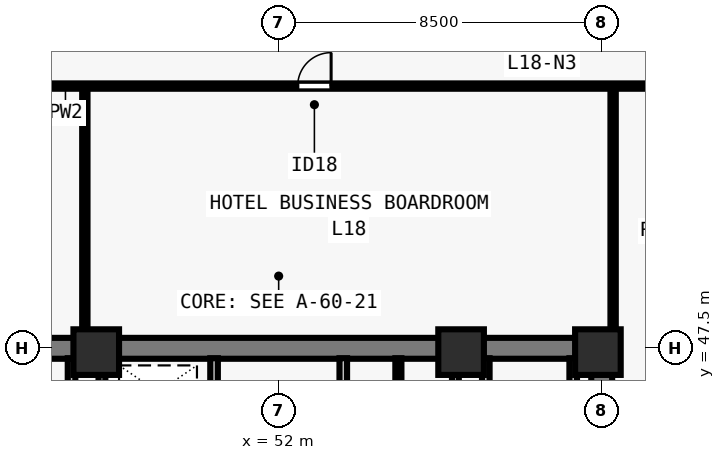
"""IFC4 building model, lengths in metres.
Left out: names, types, materials, properties, quantities, classifications, styles, units other than length and angle.
Written with IfcOpenShell. Run it as: python <this file> out.ifc"""

import sys

from ifc_helpers import new_model, si_unit, direction, frame, frame_2d, origin, origin_2d, place, context, subcontext, project, spatial, rectangle, extrude, element, fill, save


model = new_model("IFC4")
c1 = context("Model", 3, precision=1e-05, world=origin(), true_north=direction((0.0, 1.0)))
c2 = subcontext(c1, "Body", "Model", "MODEL_VIEW")
j1 = project(units=[si_unit("LENGTHUNIT", "METRE"), si_unit("PLANEANGLEUNIT", "RADIAN")], contexts=[c1])
p1 = place(None, origin())
s1 = spatial("IfcSite", under=j1, at=p1, CompositionType="ELEMENT")
p2 = place(p1, origin())
s2 = spatial("IfcBuilding", under=s1, at=p2, CompositionType="ELEMENT")
p3 = place(p2, frame((0.0, 0.0, 69.0)))
s3 = spatial("IfcBuildingStorey", under=s2, at=p3, CompositionType="ELEMENT", Elevation=69.0)
for number, where, z_axis, x_axis in (
    (1, (47.2, 47.4, 0.0), (0.0, 0.0, 1.0), (1.0, 0.0, 0.0)),
    (2, (56.8, 47.4, 0.0), (0.0, 0.0, 1.0), (1.0, 0.0, 0.0)),
    (3, (60.4, 47.4, 0.0), (0.0, 0.0, 1.0), (1.0, 0.0, 0.0)),
):
    element("IfcColumn", number, at=place(p3, frame(where, z_axis=z_axis, x_axis=x_axis)), inside=s3, PredefinedType="COLUMN", context=c2, shape_type="SweptSolid", body=[
        extrude(rectangle(XDim=1.2, YDim=1.2, at=origin_2d()), origin(), (0.0, 0.0, 1.0), 3.5),
    ])
p4 = place(p3, frame((43.225, 47.5, 0.0), z_axis=(0.0, 0.0, 1.0), x_axis=(1.0, 0.0, 0.0)))
e4 = element("IfcWall", 4, at=p4, inside=s3, PredefinedType="SHEAR", context=c2, shape_type="SweptSolid", body=[
    extrude(rectangle(XDim=17.55, YDim=0.55, at=frame_2d((8.775, 0.0))), origin(), (0.0, 0.0, 1.0), 3.28),
])
p5 = place(p3, frame((60.5, 40.8, 0.0), z_axis=(0.0, 0.0, 1.0), x_axis=(0.0, 1.0, 0.0)))
e5 = element("IfcWall", 5, at=p5, inside=s3, PredefinedType="SHEAR", context=c2, shape_type="SweptSolid", body=[
    extrude(rectangle(XDim=6.435, YDim=0.55, at=frame_2d((3.218, 0.0))), origin(), (0.0, 0.0, 1.0), 3.28),
])
p6 = place(p3, frame((50.3, 40.585, 0.0), z_axis=(0.0, 0.0, 1.0), x_axis=(0.0, 1.0, 0.0)))
e6 = element("IfcWall", 6, at=p6, inside=s3, PredefinedType="SOLIDWALL", context=c2, shape_type="SweptSolid", body=[
    extrude(rectangle(XDim=6.655, YDim=0.2, at=frame_2d((3.328, 0.0))), origin(), (0.0, 0.0, 1.0), 3.28),
])
p7 = place(p6, frame((5.065, 0.0, 0.0)))
e7 = element("IfcOpeningElement", 7, at=p7, cuts=e6, PredefinedType="OPENING", context=c2, shape_type="SweptSolid", body=[
    extrude(rectangle(XDim=0.8, YDim=2.08, at=frame_2d((0.4, 1.04))), frame((0.0, 0.11, 0.0), z_axis=(0.0, -1.0, 0.0), x_axis=(1.0, 0.0, 0.0)), (0.0, 0.0, 1.0), 0.22),
])
p8 = place(p3, frame((53.7, 40.585, 0.0), z_axis=(0.0, 0.0, 1.0), x_axis=(0.0, 1.0, 0.0)))
e8 = element("IfcWall", 8, at=p8, inside=s3, PredefinedType="SOLIDWALL", context=c2, shape_type="SweptSolid", body=[
    extrude(rectangle(XDim=6.655, YDim=0.2, at=frame_2d((3.328, 0.0))), origin(), (0.0, 0.0, 1.0), 3.28),
])
p9 = place(p8, frame((0.195, 0.0, 0.0)))
e9 = element("IfcOpeningElement", 9, at=p9, cuts=e8, PredefinedType="OPENING", context=c2, shape_type="SweptSolid", body=[
    extrude(rectangle(XDim=0.8, YDim=2.08, at=frame_2d((0.4, 1.04))), frame((0.0, 0.11, 0.0), z_axis=(0.0, -1.0, 0.0), x_axis=(1.0, 0.0, 0.0)), (0.0, 0.0, 1.0), 0.22),
])
p10 = place(p8, frame((4.265, 0.0, 0.0)))
e10 = element("IfcOpeningElement", 10, at=p10, cuts=e8, PredefinedType="OPENING", context=c2, shape_type="SweptSolid", body=[
    extrude(rectangle(XDim=0.95, YDim=2.12, at=frame_2d((0.475, 1.06))), frame((0.0, 0.11, 0.0), z_axis=(0.0, -1.0, 0.0), x_axis=(1.0, 0.0, 0.0)), (0.0, 0.0, 1.0), 0.22),
])
for number, where, z_axis, x_axis in (
    (11, (46.55, 43.735, 0.0), (0.0, 0.0, 1.0), (0.0, 1.0, 0.0)),
    (12, (57.45, 43.735, 0.0), (0.0, 0.0, 1.0), (0.0, 1.0, 0.0)),
    (13, (59.75, 43.735, 0.0), (0.0, 0.0, 1.0), (0.0, 1.0, 0.0)),
):
    element("IfcWall", number, at=place(p3, frame(where, z_axis=z_axis, x_axis=x_axis)), inside=s3, PredefinedType="SOLIDWALL", context=c2, shape_type="SweptSolid", body=[
        extrude(rectangle(XDim=3.505, YDim=0.2, at=frame_2d((1.752, 0.0))), origin(), (0.0, 0.0, 1.0), 3.28),
    ])
for number, where, z_axis, x_axis in (
    (14, (47.35, 43.735, 0.0), (0.0, 0.0, 1.0), (0.0, 1.0, 0.0)),
    (15, (56.65, 43.735, 0.0), (0.0, 0.0, 1.0), (0.0, 1.0, 0.0)),
):
    element("IfcWall", number, at=place(p3, frame(where, z_axis=z_axis, x_axis=x_axis)), inside=s3, PredefinedType="SOLIDWALL", context=c2, shape_type="SweptSolid", body=[
        extrude(rectangle(XDim=3.505, YDim=0.18, at=frame_2d((1.752, 0.0))), origin(), (0.0, 0.0, 1.0), 3.28),
    ])
p11 = place(p3, frame((55.15, 44.195, 0.0), z_axis=(0.0, 0.0, 1.0), x_axis=(0.0, 1.0, 0.0)))
e16 = element("IfcWall", 16, at=p11, inside=s3, PredefinedType="PARTITIONING", context=c2, shape_type="SweptSolid", body=[
    extrude(rectangle(XDim=3.045, YDim=0.16, at=frame_2d((1.522, 0.0))), origin(), (0.0, 0.0, 1.0), 3.28),
])
p12 = place(p11, frame((1.025, 0.0, 0.0)))
e17 = element("IfcOpeningElement", 17, at=p12, cuts=e16, PredefinedType="OPENING", context=c2, shape_type="SweptSolid", body=[
    extrude(rectangle(XDim=0.8, YDim=2.1, at=frame_2d((0.4, 1.05))), frame((0.0, 0.09, 0.0), z_axis=(0.0, -1.0, 0.0), x_axis=(1.0, 0.0, 0.0)), (0.0, 0.0, 1.0), 0.18),
])
p13 = place(p3, frame((37.2, 54.4, 0.0), z_axis=(0.0, 0.0, 1.0), x_axis=(1.0, 0.0, 0.0)))
e18 = element("IfcWall", 18, at=p13, inside=s3, PredefinedType="PARTITIONING", context=c2, shape_type="SweptSolid", body=[
    extrude(rectangle(XDim=29.6, YDim=0.14, at=frame_2d((14.8, 0.0))), origin(), (0.0, 0.0, 1.0), 3.28),
])
p14 = place(p13, frame((2.2, 0.0, 0.0)))
e19 = element("IfcOpeningElement", 19, at=p14, cuts=e18, PredefinedType="OPENING", context=c2, shape_type="SweptSolid", body=[
    extrude(rectangle(XDim=0.88, YDim=2.1, at=frame_2d((0.44, 1.05))), frame((0.0, 0.08, 0.0), z_axis=(0.0, -1.0, 0.0), x_axis=(1.0, 0.0, 0.0)), (0.0, 0.0, 1.0), 0.16),
])
p15 = place(p13, frame((15.3, 0.0, 0.0)))
e20 = element("IfcOpeningElement", 20, at=p15, cuts=e18, PredefinedType="OPENING", context=c2, shape_type="SweptSolid", body=[
    extrude(rectangle(XDim=0.88, YDim=2.1, at=frame_2d((0.44, 1.05))), frame((0.0, 0.08, 0.0), z_axis=(0.0, -1.0, 0.0), x_axis=(1.0, 0.0, 0.0)), (0.0, 0.0, 1.0), 0.16),
])
p16 = place(p13, frame((24.8, 0.0, 0.0)))
e21 = element("IfcOpeningElement", 21, at=p16, cuts=e18, PredefinedType="OPENING", context=c2, shape_type="SweptSolid", body=[
    extrude(rectangle(XDim=0.88, YDim=2.1, at=frame_2d((0.44, 1.05))), frame((0.0, 0.08, 0.0), z_axis=(0.0, -1.0, 0.0), x_axis=(1.0, 0.0, 0.0)), (0.0, 0.0, 1.0), 0.16),
])
p17 = place(p3, frame((46.9, 47.76, 0.0), z_axis=(0.0, 0.0, 1.0), x_axis=(0.0, 1.0, 0.0)))
e22 = element("IfcWall", 22, at=p17, inside=s3, PredefinedType="PARTITIONING", context=c2, shape_type="SweptSolid", body=[
    extrude(rectangle(XDim=6.585, YDim=0.14, at=frame_2d((3.292, 0.0))), origin(), (0.0, 0.0, 1.0), 3.28),
])
p18 = place(p3, frame((60.8, 47.76, 0.0), z_axis=(0.0, 0.0, 1.0), x_axis=(0.0, 1.0, 0.0)))
e23 = element("IfcWall", 23, at=p18, inside=s3, PredefinedType="PARTITIONING", context=c2, shape_type="SweptSolid", body=[
    extrude(rectangle(XDim=6.585, YDim=0.14, at=frame_2d((3.292, 0.0))), origin(), (0.0, 0.0, 1.0), 2.439),
])
p19 = place(p15, origin())
e24 = element("IfcDoor", 24, at=p19, inside=s3, OperationType="SINGLE_SWING_RIGHT", PredefinedType="DOOR", context=c2, shape_type="SweptSolid", body=[
    extrude(rectangle(XDim=0.88, YDim=2.1, at=frame_2d((0.44, 1.05))), frame((0.0, 0.025, 0.0), z_axis=(0.0, -1.0, 0.0), x_axis=(1.0, 0.0, 0.0)), (0.0, 0.0, 1.0), 0.05),
])
fill(e20, e24)
save(model, sys.argv[1])
